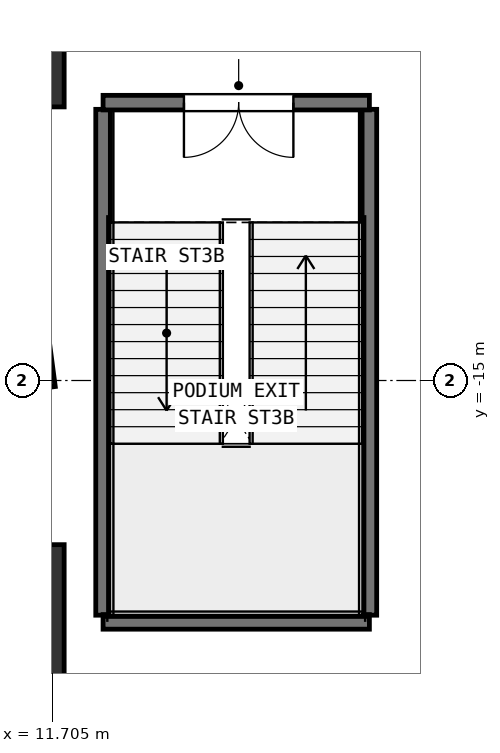
"""IFC4 building model, lengths in metres.
Left out: names, types, materials, properties, quantities, classifications, styles, units other than length and angle.
Written with IfcOpenShell. Run it as: python <this file> out.ifc"""

import sys

from ifc_helpers import new_model, si_unit, direction, frame, frame_2d, origin, origin_2d, place, context, subcontext, project, spatial, rectangle, extrude, element, fill, save


model = new_model("IFC4")
c1 = context("Model", 3, precision=1e-05, world=origin(), true_north=direction((0.0, 1.0)))
c2 = subcontext(c1, "Body", "Model", "MODEL_VIEW")
j1 = project(units=[si_unit("LENGTHUNIT", "METRE"), si_unit("PLANEANGLEUNIT", "RADIAN")], contexts=[c1])
p1 = place(None, origin())
s1 = spatial("IfcSite", under=j1, at=p1, CompositionType="ELEMENT")
p2 = place(p1, origin())
s2 = spatial("IfcBuilding", under=s1, at=p2, CompositionType="ELEMENT")
p3 = place(p2, frame((0.0, 0.0, 6.0)))
s3 = spatial("IfcBuildingStorey", under=s2, at=p3, CompositionType="ELEMENT", Elevation=6.0)
p4 = place(p3, frame((11.179, -14.569, 0.0), z_axis=(0.0, 0.0, 1.0), x_axis=(0.991444861374, 0.13052619222, 0.0)))
e1 = element("IfcColumn", 1, at=p4, inside=s3, PredefinedType="COLUMN", context=c2, shape_type="SweptSolid", body=[
    extrude(rectangle(XDim=1.0, YDim=1.2, at=origin_2d()), origin(), (0.0, 0.0, 1.0), 5.0),
])
for number, where, z_axis, x_axis in (
    (2, (11.0, -18.8, 0.0), (0.0, 0.0, 1.0), (1.0, 0.0, 0.0)),
    (3, (11.0, -9.4, 0.0), (0.0, 0.0, 1.0), (1.0, 0.0, 0.0)),
):
    element("IfcColumn", number, at=place(p3, frame(where, z_axis=z_axis, x_axis=x_axis)), inside=s3, PredefinedType="COLUMN", context=c2, shape_type="SweptSolid", body=[
        extrude(rectangle(XDim=1.8, YDim=2.2, at=origin_2d()), origin(), (0.0, 0.0, 1.0), 5.0),
    ])
for number, where, z_axis, x_axis in (
    (4, (12.54, -18.86, 0.0), (0.0, 0.0, 1.0), (0.0, 1.0, 0.0)),
    (5, (16.92, -18.86, 0.0), (0.0, 0.0, 1.0), (0.0, 1.0, 0.0)),
):
    element("IfcWall", number, at=place(p3, frame(where, z_axis=z_axis, x_axis=x_axis)), inside=s3, PredefinedType="SHEAR", context=c2, shape_type="SweptSolid", body=[
        extrude(rectangle(XDim=8.32, YDim=0.24, at=frame_2d((4.16, 0.0))), origin(), (0.0, 0.0, 1.0), 4.72),
    ])
p5 = place(p3, frame((12.54, -18.97, 0.0), z_axis=(0.0, 0.0, 1.0), x_axis=(1.0, 0.0, 0.0)))
e6 = element("IfcWall", 6, at=p5, inside=s3, PredefinedType="SHEAR", context=c2, shape_type="SweptSolid", body=[
    extrude(rectangle(XDim=4.38, YDim=0.24, at=frame_2d((2.19, 0.0))), origin(), (0.0, 0.0, 1.0), 4.72),
])
p6 = place(p3, frame((16.92, -10.43, 0.0), z_axis=(0.0, 0.0, 1.0), x_axis=(-1.0, 0.0, 0.0)))
e7 = element("IfcWall", 7, at=p6, inside=s3, PredefinedType="SHEAR", context=c2, shape_type="SweptSolid", body=[
    extrude(rectangle(XDim=4.38, YDim=0.24, at=frame_2d((2.19, 0.0))), origin(), (0.0, 0.0, 1.0), 4.72),
])
p7 = place(p6, frame((1.25, 0.0, 0.0)))
e8 = element("IfcOpeningElement", 8, at=p7, cuts=e7, PredefinedType="OPENING", context=c2, shape_type="SweptSolid", body=[
    extrude(rectangle(XDim=1.8, YDim=2.2, at=frame_2d((0.9, 1.1))), frame((0.0, 0.13, 0.0), z_axis=(0.0, -1.0, 0.0), x_axis=(1.0, 0.0, 0.0)), (0.0, 0.0, 1.0), 0.26),
])
p8 = place(p7, origin())
e9 = element("IfcDoor", 9, at=p8, inside=s3, OperationType="DOUBLE_DOOR_SINGLE_SWING", PredefinedType="DOOR", context=c2, shape_type="SweptSolid", body=[
    extrude(rectangle(XDim=1.8, YDim=2.2, at=frame_2d((0.9, 1.1))), frame((0.0, 0.025, 0.0), z_axis=(0.0, -1.0, 0.0), x_axis=(1.0, 0.0, 0.0)), (0.0, 0.0, 1.0), 0.05),
])
fill(e8, e9)
save(model, sys.argv[1])
